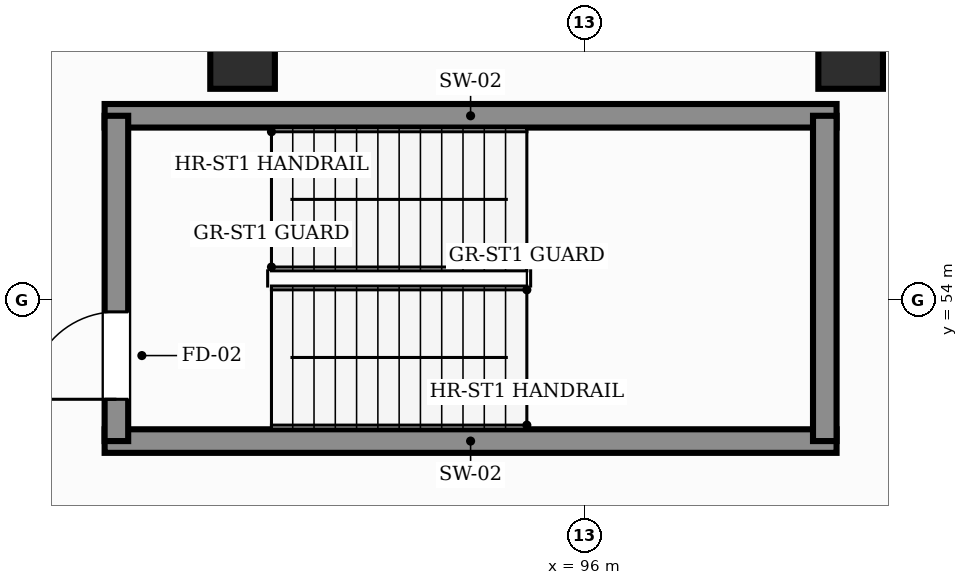
"""IFC4 building model, lengths in metres.
Left out: names, types, materials, properties, quantities, classifications, styles, units other than length and angle.
Written with IfcOpenShell. Run it as: python <this file> out.ifc"""

import sys

from ifc_helpers import new_model, si_unit, direction, frame, frame_2d, origin, origin_2d, place, context, subcontext, project, spatial, rectangle, extrude, element, fill, save


model = new_model("IFC4")
c1 = context("Model", 3, precision=1e-05, world=origin(), true_north=direction((0.0, 1.0)))
c2 = subcontext(c1, "Body", "Model", "MODEL_VIEW")
j1 = project(units=[si_unit("LENGTHUNIT", "METRE"), si_unit("PLANEANGLEUNIT", "RADIAN")], contexts=[c1])
p1 = place(None, origin())
s1 = spatial("IfcSite", under=j1, at=p1, CompositionType="ELEMENT")
p2 = place(p1, origin())
s2 = spatial("IfcBuilding", under=s1, at=p2, CompositionType="ELEMENT")
p3 = place(p2, frame((0.0, 0.0, -4.8)))
s3 = spatial("IfcBuildingStorey", under=s2, at=p3, CompositionType="ELEMENT", Elevation=-4.8)
for number, where, z_axis, x_axis in (
    (1, (91.5, 57.2, 0.0), (0.0, 0.0, 1.0), (1.0, 0.0, 0.0)),
    (2, (99.5, 57.2, 0.0), (0.0, 0.0, 1.0), (1.0, 0.0, 0.0)),
):
    element("IfcColumn", number, at=place(p3, frame(where, z_axis=z_axis, x_axis=x_axis)), inside=s3, PredefinedType="COLUMN", context=c2, shape_type="SweptSolid", body=[
        extrude(rectangle(XDim=0.85, YDim=0.85, at=origin_2d()), origin(), (0.0, 0.0, 1.0), 4.8),
    ])
for number, where, z_axis, x_axis in (
    (3, (89.685, 52.14, 0.0), (0.0, 0.0, 1.0), (1.0, 0.0, 0.0)),
    (4, (89.685, 56.42, 0.0), (0.0, 0.0, 1.0), (1.0, 0.0, 0.0)),
):
    element("IfcWall", number, at=place(p3, frame(where, z_axis=z_axis, x_axis=x_axis)), inside=s3, PredefinedType="SHEAR", context=c2, shape_type="SweptSolid", body=[
        extrude(rectangle(XDim=9.63, YDim=0.31, at=frame_2d((4.815, 0.0))), origin(), (0.0, 0.0, 1.0), 4.8),
    ])
p4 = place(p3, frame((89.84, 52.14, 0.0), z_axis=(0.0, 0.0, 1.0), x_axis=(0.0, 1.0, 0.0)))
e5 = element("IfcWall", 5, at=p4, inside=s3, PredefinedType="SHEAR", context=c2, shape_type="SweptSolid", body=[
    extrude(rectangle(XDim=4.28, YDim=0.31, at=frame_2d((2.14, 0.0))), origin(), (0.0, 0.0, 1.0), 4.8),
])
p5 = place(p4, frame((0.55, 0.0, 0.0)))
e6 = element("IfcOpeningElement", 6, at=p5, cuts=e5, PredefinedType="OPENING", context=c2, shape_type="SweptSolid", body=[
    extrude(rectangle(XDim=1.15, YDim=2.2, at=frame_2d((0.575, 1.1))), frame((0.0, 0.165, 0.0), z_axis=(0.0, -1.0, 0.0), x_axis=(1.0, 0.0, 0.0)), (0.0, 0.0, 1.0), 0.33),
])
p6 = place(p3, frame((99.16, 52.14, 0.0), z_axis=(0.0, 0.0, 1.0), x_axis=(0.0, 1.0, 0.0)))
e7 = element("IfcWall", 7, at=p6, inside=s3, PredefinedType="SHEAR", context=c2, shape_type="SweptSolid", body=[
    extrude(rectangle(XDim=4.28, YDim=0.31, at=frame_2d((2.14, 0.0))), origin(), (0.0, 0.0, 1.0), 4.8),
])
p7 = place(p5, origin())
e8 = element("IfcDoor", 8, at=p7, inside=s3, OperationType="SINGLE_SWING_LEFT", PredefinedType="DOOR", context=c2, shape_type="SweptSolid", body=[
    extrude(rectangle(XDim=1.15, YDim=2.2, at=frame_2d((0.575, 1.1))), frame((0.0, 0.025, 0.0), z_axis=(0.0, -1.0, 0.0), x_axis=(1.0, 0.0, 0.0)), (0.0, 0.0, 1.0), 0.05),
])
fill(e6, e8)
save(model, sys.argv[1])
